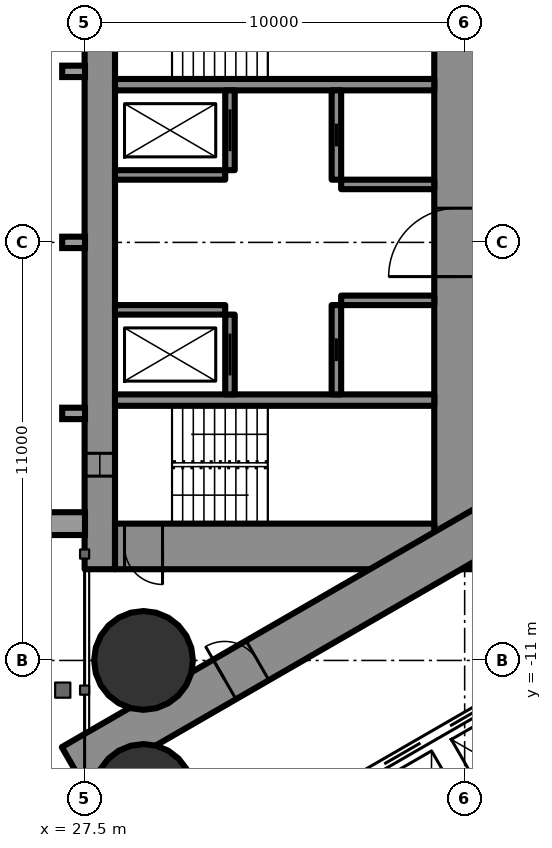
"""IFC4 building model, lengths in metres.
Left out: names, types, materials, properties, quantities, classifications, styles, units other than length and angle.
Written with IfcOpenShell. Run it as: python <this file> out.ifc"""

import sys

from ifc_helpers import new_model, si_unit, direction, frame, frame_2d, origin, origin_2d, place, context, subcontext, project, spatial, rectangle, hollow_circle, extrude, element, fill, save


model = new_model("IFC4")
c1 = context("Model", 3, precision=1e-05, world=origin(), true_north=direction((0.0, 1.0)))
c2 = subcontext(c1, "Body", "Model", "MODEL_VIEW")
j1 = project(units=[si_unit("LENGTHUNIT", "METRE"), si_unit("PLANEANGLEUNIT", "RADIAN")], contexts=[c1])
p1 = place(None, origin())
s1 = spatial("IfcSite", under=j1, at=p1, CompositionType="ELEMENT")
p2 = place(p1, origin())
s2 = spatial("IfcBuilding", under=s1, at=p2, CompositionType="ELEMENT")
p3 = place(p2, frame((0.0, 0.0, 132.6)))
s3 = spatial("IfcBuildingStorey", under=s2, at=p3, CompositionType="ELEMENT", Elevation=132.6)
for number, where, z_axis, x_axis in (
    (1, (29.05, -11.0, 0.0), (0.0, 0.0, 1.0), (1.0, 0.0, 0.0)),
    (2, (29.05, -14.5, 0.0), (0.0, 0.0, 1.0), (1.0, 0.0, 0.0)),
):
    element("IfcColumn", number, at=place(p3, frame(where, z_axis=z_axis, x_axis=x_axis)), inside=s3, PredefinedType="COLUMN", context=c2, shape_type="SweptSolid", body=[
        extrude(hollow_circle(Radius=1.3, WallThickness=0.1, at=origin_2d()), origin(), (0.0, 0.0, 1.0), 3.5),
    ])
p4 = place(p3, frame((27.9, -8.6, 0.0), z_axis=(0.0, 0.0, 1.0), x_axis=(0.0, 1.0, 0.0)))
e3 = element("IfcWall", 3, at=p4, inside=s3, PredefinedType="SHEAR", context=c2, shape_type="SweptSolid", body=[
    extrude(rectangle(XDim=17.2, YDim=0.8, at=frame_2d((8.6, 0.0))), origin(), (0.0, 0.0, 1.0), 3.5),
])
p5 = place(p4, frame((2.45, 0.0, 0.6)))
e4 = element("IfcOpeningElement", 4, at=p5, cuts=e3, PredefinedType="OPENING", context=c2, shape_type="SweptSolid", body=[
    extrude(rectangle(XDim=0.6, YDim=2.1, at=frame_2d((0.3, 1.05))), frame((0.0, 0.41, 0.0), z_axis=(0.0, -1.0, 0.0), x_axis=(1.0, 0.0, 0.0)), (0.0, 0.0, 1.0), 0.82),
])
p6 = place(p4, frame((14.15, 0.0, 0.6)))
e5 = element("IfcOpeningElement", 5, at=p6, cuts=e3, PredefinedType="OPENING", context=c2, shape_type="SweptSolid", body=[
    extrude(rectangle(XDim=0.6, YDim=2.1, at=frame_2d((0.3, 1.05))), frame((0.0, 0.41, 0.0), z_axis=(0.0, -1.0, 0.0), x_axis=(1.0, 0.0, 0.0)), (0.0, 0.0, 1.0), 0.82),
])
p7 = place(p3, frame((37.3, -8.6, 0.0), z_axis=(0.0, 0.0, 1.0), x_axis=(0.0, 1.0, 0.0)))
e6 = element("IfcWall", 6, at=p7, inside=s3, PredefinedType="SHEAR", context=c2, shape_type="SweptSolid", body=[
    extrude(rectangle(XDim=17.2, YDim=1.2, at=frame_2d((8.6, 0.0))), origin(), (0.0, 0.0, 1.0), 3.5),
])
p8 = place(p7, frame((7.7, 0.0, 0.0)))
e7 = element("IfcOpeningElement", 7, at=p8, cuts=e6, PredefinedType="OPENING", context=c2, shape_type="SweptSolid", body=[
    extrude(rectangle(XDim=1.8, YDim=2.2, at=frame_2d((0.9, 1.1))), frame((0.0, 0.61, 0.0), z_axis=(0.0, -1.0, 0.0), x_axis=(1.0, 0.0, 0.0)), (0.0, 0.0, 1.0), 1.22),
])
p9 = place(p3, frame((28.3, -8.0, 0.0), z_axis=(0.0, 0.0, 1.0), x_axis=(1.0, 0.0, 0.0)))
e8 = element("IfcWall", 8, at=p9, inside=s3, PredefinedType="SHEAR", context=c2, shape_type="SweptSolid", body=[
    extrude(rectangle(XDim=8.4, YDim=1.2, at=frame_2d((4.2, 0.0))), origin(), (0.0, 0.0, 1.0), 3.5),
])
p10 = place(p9, frame((0.25, 0.0, 0.0)))
e9 = element("IfcOpeningElement", 9, at=p10, cuts=e8, PredefinedType="OPENING", context=c2, shape_type="SweptSolid", body=[
    extrude(rectangle(XDim=1.0, YDim=2.2, at=frame_2d((0.5, 1.1))), frame((0.0, 0.61, 0.0), z_axis=(0.0, -1.0, 0.0), x_axis=(1.0, 0.0, 0.0)), (0.0, 0.0, 1.0), 1.22),
])
for number, where, z_axis, x_axis in (
    (10, (28.3, -4.15, 0.0), (0.0, 0.0, 1.0), (1.0, 0.0, 0.0)),
    (11, (28.3, 4.15, 0.0), (0.0, 0.0, 1.0), (1.0, 0.0, 0.0)),
):
    element("IfcWall", number, at=place(p3, frame(where, z_axis=z_axis, x_axis=x_axis)), inside=s3, PredefinedType="SHEAR", context=c2, shape_type="SweptSolid", body=[
        extrude(rectangle(XDim=8.4, YDim=0.3, at=frame_2d((4.2, 0.0))), origin(), (0.0, 0.0, 1.0), 3.5),
    ])
p11 = place(p3, frame((31.325, -4.0, 0.0), z_axis=(0.0, 0.0, 1.0), x_axis=(0.0, 1.0, 0.0)))
e12 = element("IfcWall", 12, at=p11, inside=s3, PredefinedType="SHEAR", context=c2, shape_type="SweptSolid", body=[
    extrude(rectangle(XDim=2.1, YDim=0.25, at=frame_2d((1.05, 0.0))), origin(), (0.0, 0.0, 1.0), 3.5),
])
p12 = place(p11, frame((0.5, 0.0, 0.0)))
e13 = element("IfcOpeningElement", 13, at=p12, cuts=e12, PredefinedType="OPENING", context=c2, shape_type="SweptSolid", body=[
    extrude(rectangle(XDim=1.1, YDim=2.2, at=frame_2d((0.55, 1.1))), frame((0.0, 0.135, 0.0), z_axis=(0.0, -1.0, 0.0), x_axis=(1.0, 0.0, 0.0)), (0.0, 0.0, 1.0), 0.27),
])
p13 = place(p3, frame((34.125, -4.0, 0.0), z_axis=(0.0, 0.0, 1.0), x_axis=(0.0, 1.0, 0.0)))
e14 = element("IfcWall", 14, at=p13, inside=s3, PredefinedType="SHEAR", context=c2, shape_type="SweptSolid", body=[
    extrude(rectangle(XDim=2.35, YDim=0.25, at=frame_2d((1.175, 0.0))), origin(), (0.0, 0.0, 1.0), 3.5),
])
p14 = place(p13, frame((0.875, 0.0, 0.0)))
e15 = element("IfcOpeningElement", 15, at=p14, cuts=e14, PredefinedType="OPENING", context=c2, shape_type="SweptSolid", body=[
    extrude(rectangle(XDim=0.6, YDim=2.0, at=frame_2d((0.3, 1.0))), frame((0.0, 0.135, 0.0), z_axis=(0.0, -1.0, 0.0), x_axis=(1.0, 0.0, 0.0)), (0.0, 0.0, 1.0), 0.27),
])
p15 = place(p3, frame((28.3, -1.775, 0.0), z_axis=(0.0, 0.0, 1.0), x_axis=(1.0, 0.0, 0.0)))
e16 = element("IfcWall", 16, at=p15, inside=s3, PredefinedType="SHEAR", context=c2, shape_type="SweptSolid", body=[
    extrude(rectangle(XDim=2.9, YDim=0.25, at=frame_2d((1.45, 0.0))), origin(), (0.0, 0.0, 1.0), 3.5),
])
p16 = place(p3, frame((34.25, -1.525, 0.0), z_axis=(0.0, 0.0, 1.0), x_axis=(1.0, 0.0, 0.0)))
e17 = element("IfcWall", 17, at=p16, inside=s3, PredefinedType="SHEAR", context=c2, shape_type="SweptSolid", body=[
    extrude(rectangle(XDim=2.45, YDim=0.25, at=frame_2d((1.225, 0.0))), origin(), (0.0, 0.0, 1.0), 3.5),
])
p17 = place(p3, frame((31.325, 1.9, 0.0), z_axis=(0.0, 0.0, 1.0), x_axis=(0.0, 1.0, 0.0)))
e18 = element("IfcWall", 18, at=p17, inside=s3, PredefinedType="SHEAR", context=c2, shape_type="SweptSolid", body=[
    extrude(rectangle(XDim=2.1, YDim=0.25, at=frame_2d((1.05, 0.0))), origin(), (0.0, 0.0, 1.0), 3.5),
])
p18 = place(p17, frame((0.5, 0.0, 0.0)))
e19 = element("IfcOpeningElement", 19, at=p18, cuts=e18, PredefinedType="OPENING", context=c2, shape_type="SweptSolid", body=[
    extrude(rectangle(XDim=1.1, YDim=2.2, at=frame_2d((0.55, 1.1))), frame((0.0, 0.135, 0.0), z_axis=(0.0, -1.0, 0.0), x_axis=(1.0, 0.0, 0.0)), (0.0, 0.0, 1.0), 0.27),
])
p19 = place(p3, frame((34.125, 1.65, 0.0), z_axis=(0.0, 0.0, 1.0), x_axis=(0.0, 1.0, 0.0)))
e20 = element("IfcWall", 20, at=p19, inside=s3, PredefinedType="SHEAR", context=c2, shape_type="SweptSolid", body=[
    extrude(rectangle(XDim=2.35, YDim=0.25, at=frame_2d((1.175, 0.0))), origin(), (0.0, 0.0, 1.0), 3.5),
])
p20 = place(p19, frame((0.875, 0.0, 0.0)))
e21 = element("IfcOpeningElement", 21, at=p20, cuts=e20, PredefinedType="OPENING", context=c2, shape_type="SweptSolid", body=[
    extrude(rectangle(XDim=0.6, YDim=2.0, at=frame_2d((0.3, 1.0))), frame((0.0, 0.135, 0.0), z_axis=(0.0, -1.0, 0.0), x_axis=(1.0, 0.0, 0.0)), (0.0, 0.0, 1.0), 0.27),
])
p21 = place(p3, frame((28.3, 1.775, 0.0), z_axis=(0.0, 0.0, 1.0), x_axis=(1.0, 0.0, 0.0)))
e22 = element("IfcWall", 22, at=p21, inside=s3, PredefinedType="SHEAR", context=c2, shape_type="SweptSolid", body=[
    extrude(rectangle(XDim=2.9, YDim=0.25, at=frame_2d((1.45, 0.0))), origin(), (0.0, 0.0, 1.0), 3.5),
])
p22 = place(p3, frame((34.25, 1.525, 0.0), z_axis=(0.0, 0.0, 1.0), x_axis=(1.0, 0.0, 0.0)))
e23 = element("IfcWall", 23, at=p22, inside=s3, PredefinedType="SHEAR", context=c2, shape_type="SweptSolid", body=[
    extrude(rectangle(XDim=2.45, YDim=0.25, at=frame_2d((1.225, 0.0))), origin(), (0.0, 0.0, 1.0), 3.5),
])
p23 = place(p3, frame((27.2, -13.8, 0.0), z_axis=(0.0, 0.0, 1.0), x_axis=(0.866027159892, 0.499996958321, 0.0)))
e24 = element("IfcWall", 24, at=p23, inside=s3, PredefinedType="SHEAR", context=c2, shape_type="SweptSolid", body=[
    extrude(rectangle(XDim=27.947, YDim=1.2, at=frame_2d((13.973, 0.0))), origin(), (0.0, 0.0, 1.0), 3.5),
])
p24 = place(p23, frame((4.6, 0.0, 0.0)))
e25 = element("IfcOpeningElement", 25, at=p24, cuts=e24, PredefinedType="OPENING", context=c2, shape_type="SweptSolid", body=[
    extrude(rectangle(XDim=1.0, YDim=2.2, at=frame_2d((0.5, 1.1))), frame((0.0, 0.61, 0.0), z_axis=(0.0, -1.0, 0.0), x_axis=(1.0, 0.0, 0.0)), (0.0, 0.0, 1.0), 1.22),
])
p25 = place(p23, frame((13.395, 0.0, 0.0)))
e26 = element("IfcOpeningElement", 26, at=p25, cuts=e24, PredefinedType="OPENING", context=c2, shape_type="SweptSolid", body=[
    extrude(rectangle(XDim=1.8, YDim=2.2, at=frame_2d((0.9, 1.1))), frame((0.0, 0.61, 0.0), z_axis=(0.0, -1.0, 0.0), x_axis=(1.0, 0.0, 0.0)), (0.0, 0.0, 1.0), 1.22),
])
p26 = place(p3, frame((27.2, 13.8, 0.0), z_axis=(0.0, 0.0, 1.0), x_axis=(0.866024515034, -0.500001539357, 0.0)))
e27 = element("IfcWall", 27, at=p26, inside=s3, PredefinedType="SHEAR", context=c2, shape_type="SweptSolid", body=[
    extrude(rectangle(XDim=26.907, YDim=1.2, at=frame_2d((13.454, 0.0))), origin(), (0.0, 0.0, 1.0), 3.5),
])
p27 = place(p26, frame((4.6, 0.0, 0.0)))
e28 = element("IfcOpeningElement", 28, at=p27, cuts=e27, PredefinedType="OPENING", context=c2, shape_type="SweptSolid", body=[
    extrude(rectangle(XDim=1.0, YDim=2.2, at=frame_2d((0.5, 1.1))), frame((0.0, 0.61, 0.0), z_axis=(0.0, -1.0, 0.0), x_axis=(1.0, 0.0, 0.0)), (0.0, 0.0, 1.0), 1.22),
])
p28 = place(p26, frame((13.395, 0.0, 0.0)))
e29 = element("IfcOpeningElement", 29, at=p28, cuts=e27, PredefinedType="OPENING", context=c2, shape_type="SweptSolid", body=[
    extrude(rectangle(XDim=1.8, YDim=2.2, at=frame_2d((0.9, 1.1))), frame((0.0, 0.61, 0.0), z_axis=(0.0, -1.0, 0.0), x_axis=(1.0, 0.0, 0.0)), (0.0, 0.0, 1.0), 1.22),
])
p29 = place(p3, frame((36.834, 10.894, 0.0), z_axis=(0.0, 0.0, 1.0), x_axis=(0.866028157229, -0.499995230863, 0.0)))
e30 = element("IfcWall", 30, at=p29, inside=s3, PredefinedType="PARTITIONING", context=c2, shape_type="SweptSolid", body=[
    extrude(rectangle(XDim=21.667, YDim=0.2, at=frame_2d((10.833, 0.0))), origin(), (0.0, 0.0, 1.0), 3.25),
])
p30 = place(p29, frame((20.117, 0.0, 0.0)))
e31 = element("IfcOpeningElement", 31, at=p30, cuts=e30, PredefinedType="OPENING", context=c2, shape_type="SweptSolid", body=[
    extrude(rectangle(XDim=0.95, YDim=2.2, at=frame_2d((0.475, 1.1))), frame((0.0, 0.11, 0.0), z_axis=(0.0, -1.0, 0.0), x_axis=(1.0, 0.0, 0.0)), (0.0, 0.0, 1.0), 0.22),
])
p31 = place(p29, frame((14.938, 0.0, 0.0)))
e32 = element("IfcOpeningElement", 32, at=p31, cuts=e30, PredefinedType="OPENING", context=c2, shape_type="SweptSolid", body=[
    extrude(rectangle(XDim=1.8, YDim=2.2, at=frame_2d((0.9, 1.1))), frame((0.0, 0.11, 0.0), z_axis=(0.0, -1.0, 0.0), x_axis=(1.0, 0.0, 0.0)), (0.0, 0.0, 1.0), 0.22),
])
p32 = place(p29, frame((9.99, 0.0, 0.0)))
e33 = element("IfcOpeningElement", 33, at=p32, cuts=e30, PredefinedType="OPENING", context=c2, shape_type="SweptSolid", body=[
    extrude(rectangle(XDim=0.95, YDim=2.2, at=frame_2d((0.475, 1.1))), frame((0.0, 0.11, 0.0), z_axis=(0.0, -1.0, 0.0), x_axis=(1.0, 0.0, 0.0)), (0.0, 0.0, 1.0), 0.22),
])
p33 = place(p29, frame((3.35, 0.0, 0.0)))
e34 = element("IfcOpeningElement", 34, at=p33, cuts=e30, PredefinedType="OPENING", context=c2, shape_type="SweptSolid", body=[
    extrude(rectangle(XDim=1.0, YDim=2.2, at=frame_2d((0.5, 1.1))), frame((0.0, 0.11, 0.0), z_axis=(0.0, -1.0, 0.0), x_axis=(1.0, 0.0, 0.0)), (0.0, 0.0, 1.0), 0.22),
])
p34 = place(p3, frame((31.271, -16.097, 0.0), z_axis=(0.0, 0.0, 1.0), x_axis=(0.86604045752, 0.499973925258, 0.0)))
e35 = element("IfcWall", 35, at=p34, inside=s3, PredefinedType="PARTITIONING", context=c2, shape_type="SweptSolid", body=[
    extrude(rectangle(XDim=8.6, YDim=0.25, at=frame_2d((4.3, 0.0))), origin(), (0.0, 0.0, 1.0), 3.25),
])
p35 = place(p34, frame((0.75, 0.0, 0.0)))
e36 = element("IfcOpeningElement", 36, at=p35, cuts=e35, PredefinedType="OPENING", context=c2, shape_type="SweptSolid", body=[
    extrude(rectangle(XDim=1.1, YDim=2.2, at=frame_2d((0.55, 1.1))), frame((0.0, 0.135, 0.0), z_axis=(0.0, -1.0, 0.0), x_axis=(1.0, 0.0, 0.0)), (0.0, 0.0, 1.0), 0.27),
])
p36 = place(p34, frame((2.75, 0.0, 0.0)))
e37 = element("IfcOpeningElement", 37, at=p36, cuts=e35, PredefinedType="OPENING", context=c2, shape_type="SweptSolid", body=[
    extrude(rectangle(XDim=1.1, YDim=2.2, at=frame_2d((0.55, 1.1))), frame((0.0, 0.135, 0.0), z_axis=(0.0, -1.0, 0.0), x_axis=(1.0, 0.0, 0.0)), (0.0, 0.0, 1.0), 0.27),
])
p37 = place(p34, frame((4.75, 0.0, 0.0)))
e38 = element("IfcOpeningElement", 38, at=p37, cuts=e35, PredefinedType="OPENING", context=c2, shape_type="SweptSolid", body=[
    extrude(rectangle(XDim=1.1, YDim=2.2, at=frame_2d((0.55, 1.1))), frame((0.0, 0.135, 0.0), z_axis=(0.0, -1.0, 0.0), x_axis=(1.0, 0.0, 0.0)), (0.0, 0.0, 1.0), 0.27),
])
p38 = place(p34, frame((6.75, 0.0, 0.0)))
e39 = element("IfcOpeningElement", 39, at=p38, cuts=e35, PredefinedType="OPENING", context=c2, shape_type="SweptSolid", body=[
    extrude(rectangle(XDim=1.1, YDim=2.2, at=frame_2d((0.55, 1.1))), frame((0.0, 0.135, 0.0), z_axis=(0.0, -1.0, 0.0), x_axis=(1.0, 0.0, 0.0)), (0.0, 0.0, 1.0), 0.27),
])
p39 = place(p24, origin())
e40 = element("IfcDoor", 40, at=p39, inside=s3, OperationType="SINGLE_SWING_LEFT", PredefinedType="DOOR", context=c2, shape_type="SweptSolid", body=[
    extrude(rectangle(XDim=1.0, YDim=2.2, at=frame_2d((0.5, 1.1))), frame((0.0, 0.025, 0.0), z_axis=(0.0, -1.0, 0.0), x_axis=(1.0, 0.0, 0.0)), (0.0, 0.0, 1.0), 0.05),
])
fill(e25, e40)
p40 = place(p8, origin())
e41 = element("IfcDoor", 41, at=p40, inside=s3, OperationType="DOUBLE_DOOR_SINGLE_SWING", PredefinedType="DOOR", context=c2, shape_type="SweptSolid", body=[
    extrude(rectangle(XDim=1.8, YDim=2.2, at=frame_2d((0.9, 1.1))), frame((0.0, 0.025, 0.0), z_axis=(0.0, -1.0, 0.0), x_axis=(1.0, 0.0, 0.0)), (0.0, 0.0, 1.0), 0.05),
])
fill(e7, e41)
p41 = place(p10, origin())
e42 = element("IfcDoor", 42, at=p41, inside=s3, OperationType="SINGLE_SWING_RIGHT", PredefinedType="DOOR", context=c2, shape_type="SweptSolid", body=[
    extrude(rectangle(XDim=1.0, YDim=2.2, at=frame_2d((0.5, 1.1))), frame((0.0, 0.025, 0.0), z_axis=(0.0, -1.0, 0.0), x_axis=(1.0, 0.0, 0.0)), (0.0, 0.0, 1.0), 0.05),
])
fill(e9, e42)
p42 = place(p12, origin())
e43 = element("IfcDoor", 43, at=p42, inside=s3, OperationType="SLIDING_TO_LEFT", PredefinedType="USERDEFINED", context=c2, shape_type="SweptSolid", body=[
    extrude(rectangle(XDim=1.1, YDim=2.2, at=frame_2d((0.55, 1.1))), frame((0.0, 0.025, 0.0), z_axis=(0.0, -1.0, 0.0), x_axis=(1.0, 0.0, 0.0)), (0.0, 0.0, 1.0), 0.05),
])
fill(e13, e43)
p43 = place(p18, origin())
e44 = element("IfcDoor", 44, at=p43, inside=s3, OperationType="SLIDING_TO_LEFT", PredefinedType="USERDEFINED", context=c2, shape_type="SweptSolid", body=[
    extrude(rectangle(XDim=1.1, YDim=2.2, at=frame_2d((0.55, 1.1))), frame((0.0, 0.025, 0.0), z_axis=(0.0, -1.0, 0.0), x_axis=(1.0, 0.0, 0.0)), (0.0, 0.0, 1.0), 0.05),
])
fill(e19, e44)
p44 = place(p14, origin())
e45 = element("IfcDoor", 45, at=p44, inside=s3, OperationType="SLIDING_TO_LEFT", PredefinedType="DOOR", context=c2, shape_type="SweptSolid", body=[
    extrude(rectangle(XDim=0.6, YDim=2.0, at=frame_2d((0.3, 1.0))), frame((0.0, 0.025, 0.0), z_axis=(0.0, -1.0, 0.0), x_axis=(1.0, 0.0, 0.0)), (0.0, 0.0, 1.0), 0.05),
])
fill(e15, e45)
p45 = place(p20, origin())
e46 = element("IfcDoor", 46, at=p45, inside=s3, OperationType="SLIDING_TO_LEFT", PredefinedType="DOOR", context=c2, shape_type="SweptSolid", body=[
    extrude(rectangle(XDim=0.6, YDim=2.0, at=frame_2d((0.3, 1.0))), frame((0.0, 0.025, 0.0), z_axis=(0.0, -1.0, 0.0), x_axis=(1.0, 0.0, 0.0)), (0.0, 0.0, 1.0), 0.05),
])
fill(e21, e46)
p46 = place(p37, origin())
e47 = element("IfcDoor", 47, at=p46, inside=s3, OperationType="DOUBLE_DOOR_SLIDING", PredefinedType="USERDEFINED", context=c2, shape_type="SweptSolid", body=[
    extrude(rectangle(XDim=1.1, YDim=2.2, at=frame_2d((0.55, 1.1))), frame((0.0, 0.025, 0.0), z_axis=(0.0, -1.0, 0.0), x_axis=(1.0, 0.0, 0.0)), (0.0, 0.0, 1.0), 0.05),
])
fill(e38, e47)
p47 = place(p38, origin())
e48 = element("IfcDoor", 48, at=p47, inside=s3, OperationType="DOUBLE_DOOR_SLIDING", PredefinedType="USERDEFINED", context=c2, shape_type="SweptSolid", body=[
    extrude(rectangle(XDim=1.1, YDim=2.2, at=frame_2d((0.55, 1.1))), frame((0.0, 0.025, 0.0), z_axis=(0.0, -1.0, 0.0), x_axis=(1.0, 0.0, 0.0)), (0.0, 0.0, 1.0), 0.05),
])
fill(e39, e48)
p48 = place(p5, origin())
e49 = element("IfcWindow", 49, at=p48, inside=s3, PartitioningType="SINGLE_PANEL", PredefinedType="WINDOW", context=c2, shape_type="SweptSolid", body=[
    extrude(rectangle(XDim=0.6, YDim=2.1, at=frame_2d((0.3, 1.05))), frame((0.0, 0.03, 0.0), z_axis=(0.0, -1.0, 0.0), x_axis=(1.0, 0.0, 0.0)), (0.0, 0.0, 1.0), 0.06),
])
fill(e4, e49)
save(model, sys.argv[1])
